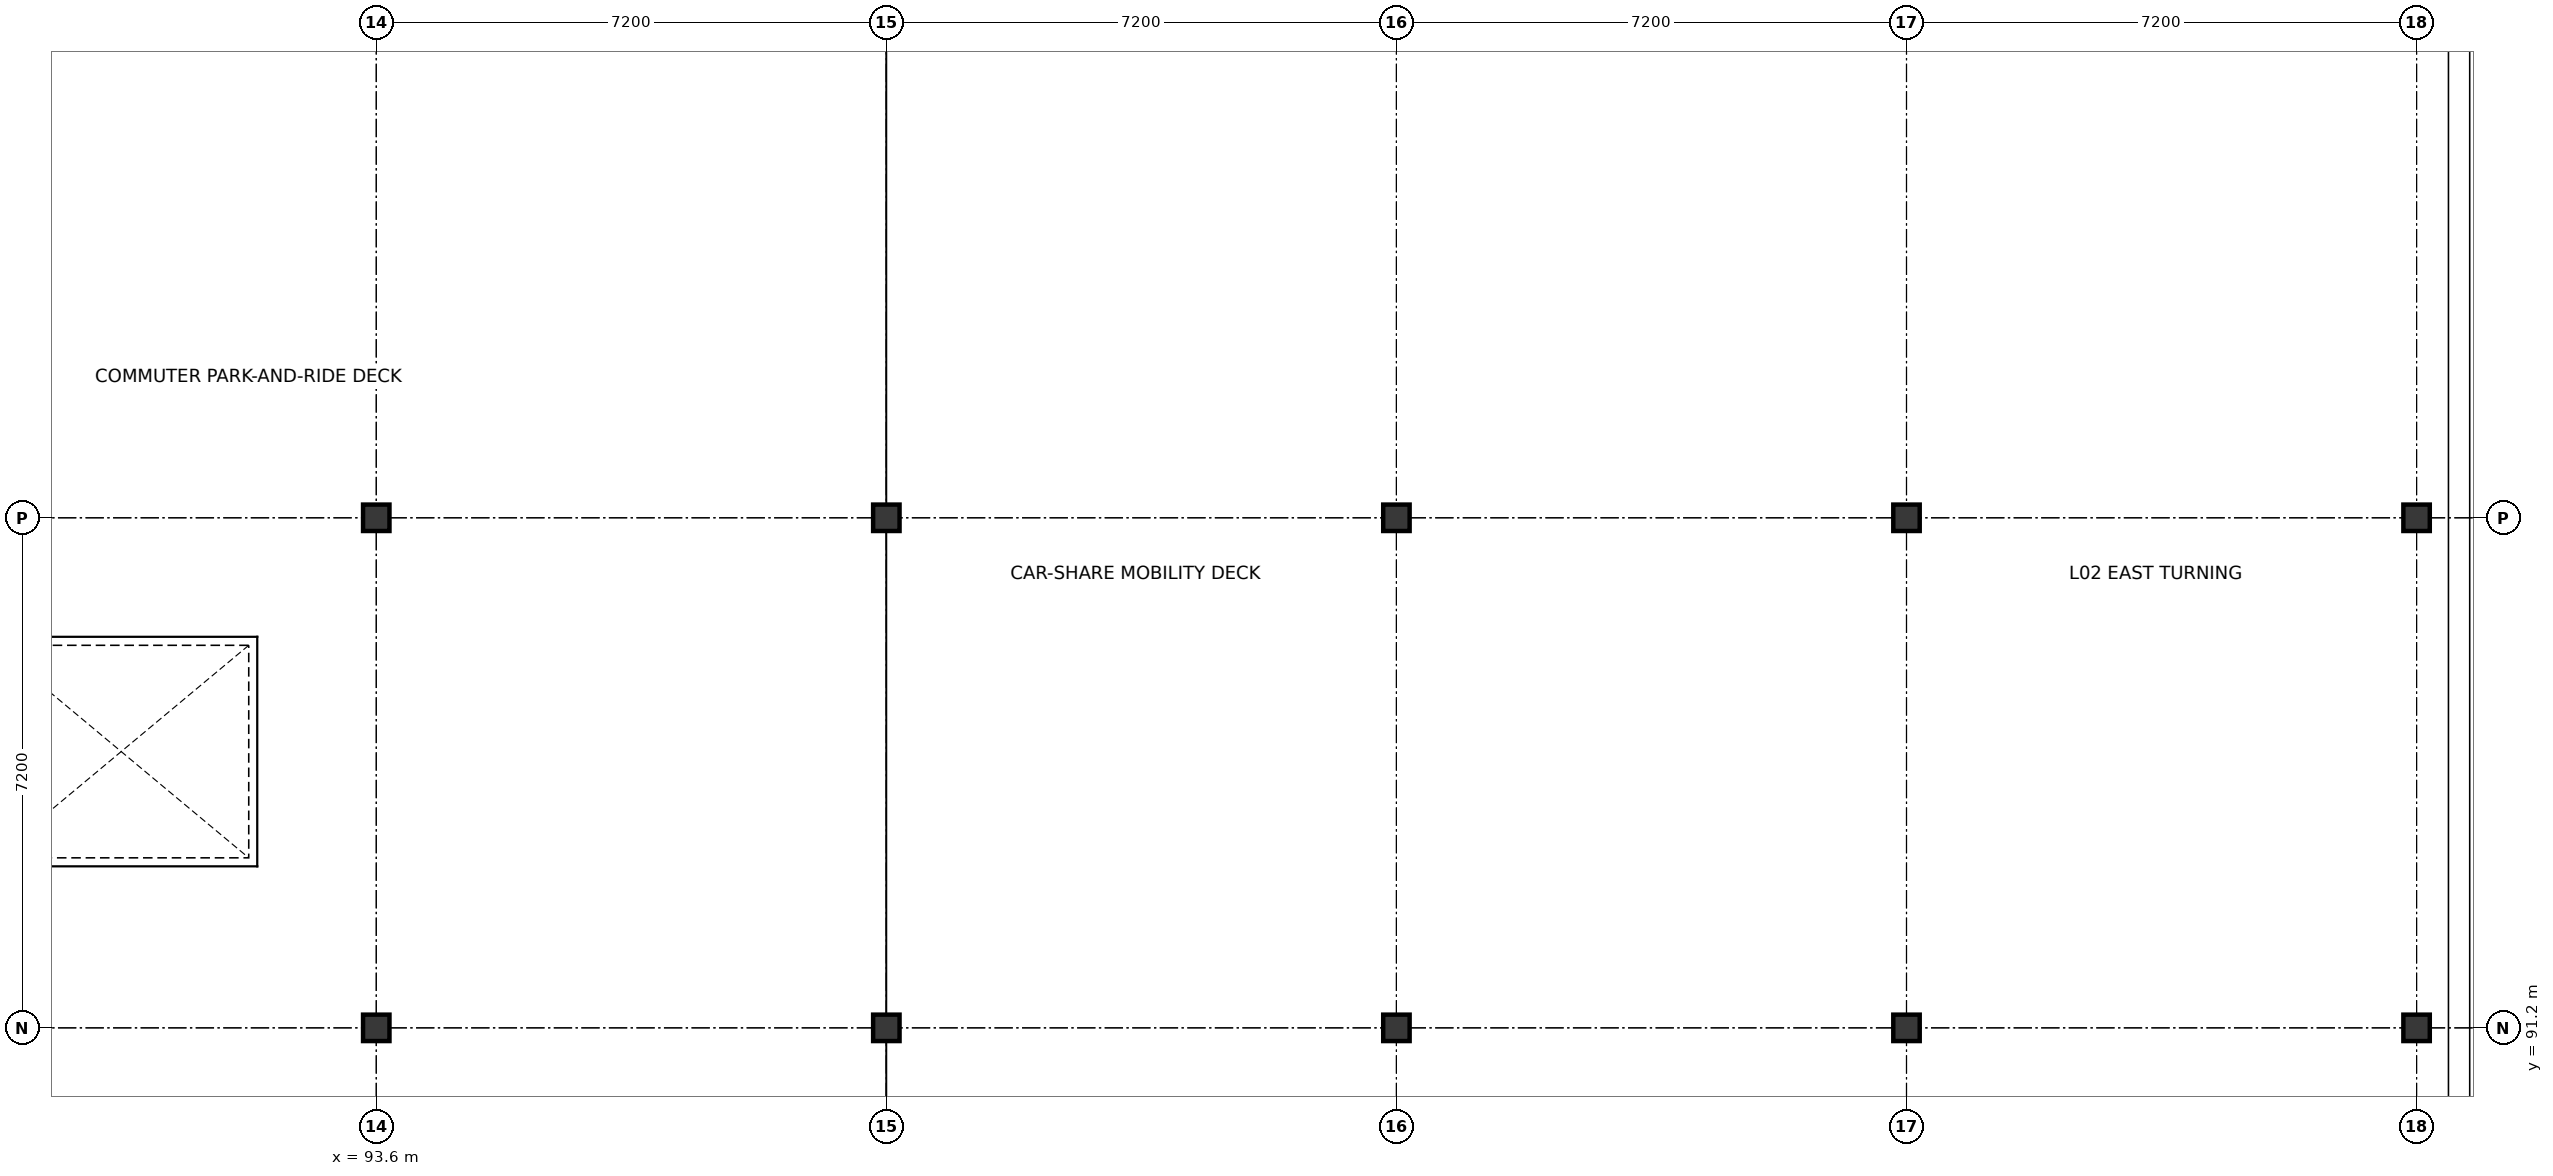
"""IFC4 building model, lengths in metres.
Left out: names, types, materials, properties, quantities, classifications, styles, units other than length and angle.
Written with IfcOpenShell. Run it as: python <this file> out.ifc"""

import sys

from ifc_helpers import new_model, si_unit, direction, frame, origin, origin_2d, place, context, subcontext, project, spatial, i_section, extrude, element, save


model = new_model("IFC4")
c1 = context("Model", 3, precision=1e-05, world=origin(), true_north=direction((0.0, 1.0)))
c2 = subcontext(c1, "Body", "Model", "MODEL_VIEW")
j1 = project(units=[si_unit("LENGTHUNIT", "METRE"), si_unit("PLANEANGLEUNIT", "RADIAN")], contexts=[c1])
p1 = place(None, origin())
s1 = spatial("IfcSite", under=j1, at=p1, CompositionType="ELEMENT")
p2 = place(p1, origin())
s2 = spatial("IfcBuilding", under=s1, at=p2, CompositionType="ELEMENT")
p3 = place(p2, frame((0.0, 0.0, 9.3)))
s3 = spatial("IfcBuildingStorey", under=s2, at=p3, CompositionType="ELEMENT", Elevation=9.3)
for number, where, z_axis, x_axis in (
    (1, (93.6, 91.2, 0.0), (0.0, 0.0, 1.0), (1.0, 0.0, 0.0)),
    (2, (93.6, 98.4, 0.0), (0.0, 0.0, 1.0), (1.0, 0.0, 0.0)),
    (3, (100.8, 91.2, 0.0), (0.0, 0.0, 1.0), (1.0, 0.0, 0.0)),
    (4, (100.8, 98.4, 0.0), (0.0, 0.0, 1.0), (1.0, 0.0, 0.0)),
    (5, (108.0, 91.2, 0.0), (0.0, 0.0, 1.0), (1.0, 0.0, 0.0)),
    (6, (108.0, 98.4, 0.0), (0.0, 0.0, 1.0), (1.0, 0.0, 0.0)),
    (7, (115.2, 91.2, 0.0), (0.0, 0.0, 1.0), (1.0, 0.0, 0.0)),
    (8, (115.2, 98.4, 0.0), (0.0, 0.0, 1.0), (1.0, 0.0, 0.0)),
    (9, (122.4, 91.2, 0.0), (0.0, 0.0, 1.0), (1.0, 0.0, 0.0)),
    (10, (122.4, 98.4, 0.0), (0.0, 0.0, 1.0), (1.0, 0.0, 0.0)),
):
    element("IfcColumn", number, at=place(p3, frame(where, z_axis=z_axis, x_axis=x_axis)), inside=s3, PredefinedType="COLUMN", context=c2, shape_type="SweptSolid", body=[
        extrude(i_section(OverallWidth=0.373, OverallDepth=0.373, WebThickness=0.016, FlangeThickness=0.026, FilletRadius=0.015, at=origin_2d()), origin(), (0.0, 0.0, 1.0), 3.9),
    ])
save(model, sys.argv[1])
